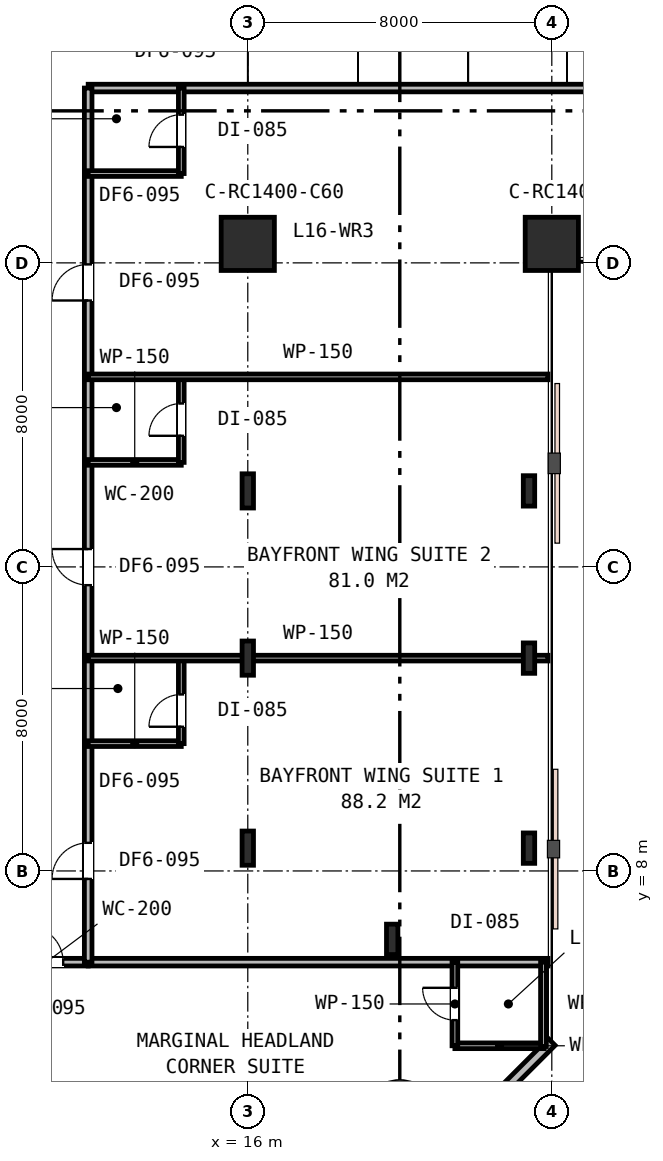
"""IFC4 building model, lengths in metres.
Left out: names, types, materials, properties, quantities, classifications, styles, units other than length and angle.
Written with IfcOpenShell. Run it as: python <this file> out.ifc"""

import sys

from ifc_helpers import new_model, si_unit, direction, frame, frame_2d, origin, origin_2d, place, context, subcontext, project, spatial, rectangle, i_section, extrude, element, fill, save


model = new_model("IFC4")
c1 = context("Model", 3, precision=1e-05, world=origin(), true_north=direction((0.0, 1.0)))
c2 = subcontext(c1, "Body", "Model", "MODEL_VIEW")
j1 = project(units=[si_unit("LENGTHUNIT", "METRE"), si_unit("PLANEANGLEUNIT", "RADIAN")], contexts=[c1])
p1 = place(None, origin())
s1 = spatial("IfcSite", under=j1, at=p1, CompositionType="ELEMENT")
p2 = place(p1, origin())
s2 = spatial("IfcBuilding", under=s1, at=p2, CompositionType="ELEMENT")
p3 = place(p2, frame((0.0, 0.0, 65.4)))
s3 = spatial("IfcBuildingStorey", under=s2, at=p3, CompositionType="ELEMENT", Elevation=65.4)
for number, where, z_axis, x_axis in (
    (1, (16.0, 24.5, 0.0), (0.0, 0.0, 1.0), (1.0, 0.0, 0.0)),
    (2, (24.0, 24.5, 0.0), (0.0, 0.0, 1.0), (1.0, 0.0, 0.0)),
):
    element("IfcColumn", number, at=place(p3, frame(where, z_axis=z_axis, x_axis=x_axis)), inside=s3, PredefinedType="COLUMN", context=c2, shape_type="SweptSolid", body=[
        extrude(rectangle(XDim=1.4, YDim=1.4, at=origin_2d()), origin(), (0.0, 0.0, 1.0), 3.6),
    ])
for number, where, z_axis, x_axis in (
    (3, (19.8, 6.2, 0.0), (0.0, 0.0, 1.0), (1.0, 0.0, 0.0)),
    (4, (23.4, 8.6, 0.0), (0.0, 0.0, 1.0), (1.0, 0.0, 0.0)),
    (5, (23.4, 13.6, 0.0), (0.0, 0.0, 1.0), (1.0, 0.0, 0.0)),
    (6, (23.4, 18.0, 0.0), (0.0, 0.0, 1.0), (1.0, 0.0, 0.0)),
):
    element("IfcColumn", number, at=place(p3, frame(where, z_axis=z_axis, x_axis=x_axis)), inside=s3, PredefinedType="COLUMN", context=c2, shape_type="SweptSolid", body=[
        extrude(i_section(OverallWidth=0.3, OverallDepth=0.8, WebThickness=0.018, FlangeThickness=0.033, FilletRadius=0.03, at=origin_2d()), origin(), (0.0, 0.0, 1.0), 3.6),
    ])
for number, where, z_axis, x_axis in (
    (7, (16.0, 8.6, 0.0), (0.0, 0.0, 1.0), (1.0, 0.0, 0.0)),
    (8, (16.0, 13.6, 0.0), (0.0, 0.0, 1.0), (1.0, 0.0, 0.0)),
    (9, (16.0, 18.0, 0.0), (0.0, 0.0, 1.0), (1.0, 0.0, 0.0)),
):
    element("IfcColumn", number, at=place(p3, frame(where, z_axis=z_axis, x_axis=x_axis)), inside=s3, PredefinedType="COLUMN", context=c2, shape_type="SweptSolid", body=[
        extrude(i_section(OverallWidth=0.3, OverallDepth=0.9, WebThickness=0.018, FlangeThickness=0.035, FilletRadius=0.03, at=origin_2d()), origin(), (0.0, 0.0, 1.0), 3.6),
    ])
p4 = place(p3, frame((20.5, 0.0, 0.0), z_axis=(0.0, 0.0, 1.0), x_axis=(0.707106781187, 0.707106781187, 0.0)))
e10 = element("IfcWall", 10, at=p4, inside=s3, PredefinedType="STANDARD", context=c2, shape_type="SweptSolid", body=[
    extrude(rectangle(XDim=4.95, YDim=0.25, at=frame_2d((2.475, 0.0))), origin(), (0.0, 0.0, 1.0), 3.33),
])
p5 = place(p4, frame((1.465, 0.0, 0.75)))
e11 = element("IfcOpeningElement", 11, at=p5, cuts=e10, PredefinedType="OPENING", context=c2, shape_type="SweptSolid", body=[
    extrude(rectangle(XDim=1.8, YDim=1.85, at=frame_2d((0.9, 0.925))), frame((0.0, 0.135, 0.0), z_axis=(0.0, -1.0, 0.0), x_axis=(1.0, 0.0, 0.0)), (0.0, 0.0, 1.0), 0.27),
])
p6 = place(p3, frame((11.8, 28.6, 0.0), z_axis=(0.0, 0.0, 1.0), x_axis=(1.0, 0.0, 0.0)))
e12 = element("IfcWall", 12, at=p6, inside=s3, PredefinedType="PARTITIONING", context=c2, shape_type="SweptSolid", body=[
    extrude(rectangle(XDim=38.6, YDim=0.2, at=frame_2d((19.3, 0.0))), origin(), (0.0, 0.0, 1.0), 2.83),
])
p7 = place(p6, frame((14.3, 0.0, 0.0)))
e13 = element("IfcOpeningElement", 13, at=p7, cuts=e12, PredefinedType="OPENING", context=c2, shape_type="SweptSolid", body=[
    extrude(rectangle(XDim=0.95, YDim=2.15, at=frame_2d((0.475, 1.075))), frame((0.0, 0.11, 0.0), z_axis=(0.0, -1.0, 0.0), x_axis=(1.0, 0.0, 0.0)), (0.0, 0.0, 1.0), 0.22),
])
p8 = place(p6, frame((22.075, 0.0, 0.0)))
e14 = element("IfcOpeningElement", 14, at=p8, cuts=e12, PredefinedType="OPENING", context=c2, shape_type="SweptSolid", body=[
    extrude(rectangle(XDim=0.95, YDim=2.15, at=frame_2d((0.475, 1.075))), frame((0.0, 0.11, 0.0), z_axis=(0.0, -1.0, 0.0), x_axis=(1.0, 0.0, 0.0)), (0.0, 0.0, 1.0), 0.22),
])
p9 = place(p6, frame((28.829, 0.0, 0.0)))
e15 = element("IfcOpeningElement", 15, at=p9, cuts=e12, PredefinedType="OPENING", context=c2, shape_type="SweptSolid", body=[
    extrude(rectangle(XDim=0.95, YDim=2.15, at=frame_2d((0.475, 1.075))), frame((0.0, 0.11, 0.0), z_axis=(0.0, -1.0, 0.0), x_axis=(1.0, 0.0, 0.0)), (0.0, 0.0, 1.0), 0.22),
])
p10 = place(p6, frame((34.669, 0.0, 0.0)))
e16 = element("IfcOpeningElement", 16, at=p10, cuts=e12, PredefinedType="OPENING", context=c2, shape_type="SweptSolid", body=[
    extrude(rectangle(XDim=0.95, YDim=2.15, at=frame_2d((0.475, 1.075))), frame((0.0, 0.11, 0.0), z_axis=(0.0, -1.0, 0.0), x_axis=(1.0, 0.0, 0.0)), (0.0, 0.0, 1.0), 0.22),
])
p11 = place(p3, frame((11.8, 5.6, 0.0), z_axis=(0.0, 0.0, 1.0), x_axis=(1.0, 0.0, 0.0)))
e17 = element("IfcWall", 17, at=p11, inside=s3, PredefinedType="PARTITIONING", context=c2, shape_type="SweptSolid", body=[
    extrude(rectangle(XDim=12.1, YDim=0.2, at=frame_2d((6.05, 0.0))), origin(), (0.0, 0.0, 1.0), 2.83),
])
p12 = place(p3, frame((9.6, 5.6, 0.0), z_axis=(0.0, 0.0, 1.0), x_axis=(1.0, 0.0, 0.0)))
e18 = element("IfcWall", 18, at=p12, inside=s3, PredefinedType="PARTITIONING", context=c2, shape_type="SweptSolid", body=[
    extrude(rectangle(XDim=2.2, YDim=0.2, at=frame_2d((1.1, 0.0))), origin(), (0.0, 0.0, 1.0), 3.33),
])
p13 = place(p12, frame((0.593, 0.0, 0.0)))
e19 = element("IfcOpeningElement", 19, at=p13, cuts=e18, PredefinedType="OPENING", context=c2, shape_type="SweptSolid", body=[
    extrude(rectangle(XDim=0.95, YDim=2.15, at=frame_2d((0.475, 1.075))), frame((0.0, 0.11, 0.0), z_axis=(0.0, -1.0, 0.0), x_axis=(1.0, 0.0, 0.0)), (0.0, 0.0, 1.0), 0.22),
])
p14 = place(p3, frame((21.45, 3.4, 0.0), z_axis=(0.0, 0.0, 1.0), x_axis=(1.0, 0.0, 0.0)))
e20 = element("IfcWall", 20, at=p14, inside=s3, PredefinedType="PARTITIONING", context=c2, shape_type="SweptSolid", body=[
    extrude(rectangle(XDim=2.35, YDim=0.15, at=frame_2d((1.175, 0.0))), origin(), (0.0, 0.0, 1.0), 3.33),
])
p15 = place(p3, frame((21.45, 3.4, 0.0), z_axis=(0.0, 0.0, 1.0), x_axis=(0.0, 1.0, 0.0)))
e21 = element("IfcWall", 21, at=p15, inside=s3, PredefinedType="PARTITIONING", context=c2, shape_type="SweptSolid", body=[
    extrude(rectangle(XDim=2.2, YDim=0.15, at=frame_2d((1.1, 0.0))), origin(), (0.0, 0.0, 1.0), 3.33),
])
p16 = place(p15, frame((0.675, 0.0, 0.0)))
e22 = element("IfcOpeningElement", 22, at=p16, cuts=e21, PredefinedType="OPENING", context=c2, shape_type="SweptSolid", body=[
    extrude(rectangle(XDim=0.85, YDim=2.15, at=frame_2d((0.425, 1.075))), frame((0.0, 0.085, 0.0), z_axis=(0.0, -1.0, 0.0), x_axis=(1.0, 0.0, 0.0)), (0.0, 0.0, 1.0), 0.17),
])
p17 = place(p3, frame((23.78, 5.6, 0.0), z_axis=(0.0, 0.0, 1.0), x_axis=(0.0, -1.0, 0.0)))
e23 = element("IfcWall", 23, at=p17, inside=s3, PredefinedType="PARTITIONING", context=c2, shape_type="SweptSolid", body=[
    extrude(rectangle(XDim=2.22, YDim=0.15, at=frame_2d((1.11, 0.0))), origin(), (0.0, 0.0, 1.0), 3.33),
])
p18 = place(p3, frame((11.8, 5.6, 0.0), z_axis=(0.0, 0.0, 1.0), x_axis=(0.0, 1.0, 0.0)))
e24 = element("IfcWall", 24, at=p18, inside=s3, PredefinedType="PARTITIONING", context=c2, shape_type="SweptSolid", body=[
    extrude(rectangle(XDim=23.0, YDim=0.2, at=frame_2d((11.5, 0.0))), origin(), (0.0, 0.0, 1.0), 2.83),
])
p19 = place(p18, frame((2.19, 0.0, 0.0)))
e25 = element("IfcOpeningElement", 25, at=p19, cuts=e24, PredefinedType="OPENING", context=c2, shape_type="SweptSolid", body=[
    extrude(rectangle(XDim=0.95, YDim=2.15, at=frame_2d((0.475, 1.075))), frame((0.0, 0.11, 0.0), z_axis=(0.0, -1.0, 0.0), x_axis=(1.0, 0.0, 0.0)), (0.0, 0.0, 1.0), 0.22),
])
p20 = place(p18, frame((9.92, 0.0, 0.0)))
e26 = element("IfcOpeningElement", 26, at=p20, cuts=e24, PredefinedType="OPENING", context=c2, shape_type="SweptSolid", body=[
    extrude(rectangle(XDim=0.95, YDim=2.15, at=frame_2d((0.475, 1.075))), frame((0.0, 0.11, 0.0), z_axis=(0.0, -1.0, 0.0), x_axis=(1.0, 0.0, 0.0)), (0.0, 0.0, 1.0), 0.22),
])
p21 = place(p18, frame((17.41, 0.0, 0.0)))
e27 = element("IfcOpeningElement", 27, at=p21, cuts=e24, PredefinedType="OPENING", context=c2, shape_type="SweptSolid", body=[
    extrude(rectangle(XDim=0.95, YDim=2.15, at=frame_2d((0.475, 1.075))), frame((0.0, 0.11, 0.0), z_axis=(0.0, -1.0, 0.0), x_axis=(1.0, 0.0, 0.0)), (0.0, 0.0, 1.0), 0.22),
])
p22 = place(p3, frame((11.8, 11.35, 0.0), z_axis=(0.0, 0.0, 1.0), x_axis=(1.0, 0.0, 0.0)))
e28 = element("IfcWall", 28, at=p22, inside=s3, PredefinedType="PARTITIONING", context=c2, shape_type="SweptSolid", body=[
    extrude(rectangle(XDim=2.45, YDim=0.15, at=frame_2d((1.225, 0.0))), origin(), (0.0, 0.0, 1.0), 3.02),
])
p23 = place(p3, frame((14.25, 11.35, 0.0), z_axis=(0.0, 0.0, 1.0), x_axis=(0.0, 1.0, 0.0)))
e29 = element("IfcWall", 29, at=p23, inside=s3, PredefinedType="PARTITIONING", context=c2, shape_type="SweptSolid", body=[
    extrude(rectangle(XDim=2.25, YDim=0.15, at=frame_2d((1.125, 0.0))), origin(), (0.0, 0.0, 1.0), 2.83),
])
p24 = place(p23, frame((0.444, 0.0, 0.0)))
e30 = element("IfcOpeningElement", 30, at=p24, cuts=e29, PredefinedType="OPENING", context=c2, shape_type="SweptSolid", body=[
    extrude(rectangle(XDim=0.85, YDim=2.15, at=frame_2d((0.425, 1.075))), frame((0.0, 0.085, 0.0), z_axis=(0.0, -1.0, 0.0), x_axis=(1.0, 0.0, 0.0)), (0.0, 0.0, 1.0), 0.17),
])
p25 = place(p3, frame((11.8, 13.6, 0.0), z_axis=(0.0, 0.0, 1.0), x_axis=(1.0, 0.0, 0.0)))
e31 = element("IfcWall", 31, at=p25, inside=s3, PredefinedType="PARTITIONING", context=c2, shape_type="SweptSolid", body=[
    extrude(rectangle(XDim=12.1, YDim=0.15, at=frame_2d((6.05, 0.0))), origin(), (0.0, 0.0, 1.0), 2.83),
])
p26 = place(p3, frame((11.8, 18.75, 0.0), z_axis=(0.0, 0.0, 1.0), x_axis=(1.0, 0.0, 0.0)))
e32 = element("IfcWall", 32, at=p26, inside=s3, PredefinedType="PARTITIONING", context=c2, shape_type="SweptSolid", body=[
    extrude(rectangle(XDim=2.45, YDim=0.15, at=frame_2d((1.225, 0.0))), origin(), (0.0, 0.0, 1.0), 3.33),
])
p27 = place(p3, frame((14.25, 18.75, 0.0), z_axis=(0.0, 0.0, 1.0), x_axis=(0.0, 1.0, 0.0)))
e33 = element("IfcWall", 33, at=p27, inside=s3, PredefinedType="PARTITIONING", context=c2, shape_type="SweptSolid", body=[
    extrude(rectangle(XDim=2.25, YDim=0.15, at=frame_2d((1.125, 0.0))), origin(), (0.0, 0.0, 1.0), 3.33),
])
p28 = place(p27, frame((0.7, 0.0, 0.0)))
e34 = element("IfcOpeningElement", 34, at=p28, cuts=e33, PredefinedType="OPENING", context=c2, shape_type="SweptSolid", body=[
    extrude(rectangle(XDim=0.85, YDim=2.15, at=frame_2d((0.425, 1.075))), frame((0.0, 0.085, 0.0), z_axis=(0.0, -1.0, 0.0), x_axis=(1.0, 0.0, 0.0)), (0.0, 0.0, 1.0), 0.17),
])
p29 = place(p3, frame((11.8, 21.0, 0.0), z_axis=(0.0, 0.0, 1.0), x_axis=(1.0, 0.0, 0.0)))
e35 = element("IfcWall", 35, at=p29, inside=s3, PredefinedType="PARTITIONING", context=c2, shape_type="SweptSolid", body=[
    extrude(rectangle(XDim=12.1, YDim=0.15, at=frame_2d((6.05, 0.0))), origin(), (0.0, 0.0, 1.0), 2.83),
])
p30 = place(p3, frame((11.8, 26.35, 0.0), z_axis=(0.0, 0.0, 1.0), x_axis=(1.0, 0.0, 0.0)))
e36 = element("IfcWall", 36, at=p30, inside=s3, PredefinedType="PARTITIONING", context=c2, shape_type="SweptSolid", body=[
    extrude(rectangle(XDim=2.45, YDim=0.15, at=frame_2d((1.225, 0.0))), origin(), (0.0, 0.0, 1.0), 3.33),
])
p31 = place(p3, frame((14.25, 26.35, 0.0), z_axis=(0.0, 0.0, 1.0), x_axis=(0.0, 1.0, 0.0)))
e37 = element("IfcWall", 37, at=p31, inside=s3, PredefinedType="PARTITIONING", context=c2, shape_type="SweptSolid", body=[
    extrude(rectangle(XDim=2.25, YDim=0.15, at=frame_2d((1.125, 0.0))), origin(), (0.0, 0.0, 1.0), 3.33),
])
p32 = place(p31, frame((0.7, 0.0, 0.0)))
e38 = element("IfcOpeningElement", 38, at=p32, cuts=e37, PredefinedType="OPENING", context=c2, shape_type="SweptSolid", body=[
    extrude(rectangle(XDim=0.85, YDim=2.15, at=frame_2d((0.425, 1.075))), frame((0.0, 0.085, 0.0), z_axis=(0.0, -1.0, 0.0), x_axis=(1.0, 0.0, 0.0)), (0.0, 0.0, 1.0), 0.17),
])
p33 = place(p13, origin())
e39 = element("IfcDoor", 39, at=p33, inside=s3, OperationType="SINGLE_SWING_LEFT", PredefinedType="DOOR", context=c2, shape_type="SweptSolid", body=[
    extrude(rectangle(XDim=0.95, YDim=2.15, at=frame_2d((0.475, 1.075))), frame((0.0, 0.025, 0.0), z_axis=(0.0, -1.0, 0.0), x_axis=(1.0, 0.0, 0.0)), (0.0, 0.0, 1.0), 0.05),
])
fill(e19, e39)
p34 = place(p16, origin())
e40 = element("IfcDoor", 40, at=p34, inside=s3, OperationType="SINGLE_SWING_RIGHT", PredefinedType="DOOR", context=c2, shape_type="SweptSolid", body=[
    extrude(rectangle(XDim=0.85, YDim=2.15, at=frame_2d((0.425, 1.075))), frame((0.0, 0.025, 0.0), z_axis=(0.0, -1.0, 0.0), x_axis=(1.0, 0.0, 0.0)), (0.0, 0.0, 1.0), 0.05),
])
fill(e22, e40)
p35 = place(p19, origin())
e41 = element("IfcDoor", 41, at=p35, inside=s3, OperationType="SINGLE_SWING_LEFT", PredefinedType="DOOR", context=c2, shape_type="SweptSolid", body=[
    extrude(rectangle(XDim=0.95, YDim=2.15, at=frame_2d((0.475, 1.075))), frame((0.0, 0.025, 0.0), z_axis=(0.0, -1.0, 0.0), x_axis=(1.0, 0.0, 0.0)), (0.0, 0.0, 1.0), 0.05),
])
fill(e25, e41)
p36 = place(p24, origin())
e42 = element("IfcDoor", 42, at=p36, inside=s3, OperationType="SINGLE_SWING_LEFT", PredefinedType="DOOR", context=c2, shape_type="SweptSolid", body=[
    extrude(rectangle(XDim=0.85, YDim=2.15, at=frame_2d((0.425, 1.075))), frame((0.0, 0.025, 0.0), z_axis=(0.0, -1.0, 0.0), x_axis=(1.0, 0.0, 0.0)), (0.0, 0.0, 1.0), 0.05),
])
fill(e30, e42)
p37 = place(p20, origin())
e43 = element("IfcDoor", 43, at=p37, inside=s3, OperationType="SINGLE_SWING_RIGHT", PredefinedType="DOOR", context=c2, shape_type="SweptSolid", body=[
    extrude(rectangle(XDim=0.95, YDim=2.15, at=frame_2d((0.475, 1.075))), frame((0.0, 0.025, 0.0), z_axis=(0.0, -1.0, 0.0), x_axis=(1.0, 0.0, 0.0)), (0.0, 0.0, 1.0), 0.05),
])
fill(e26, e43)
p38 = place(p28, origin())
e44 = element("IfcDoor", 44, at=p38, inside=s3, OperationType="SINGLE_SWING_LEFT", PredefinedType="DOOR", context=c2, shape_type="SweptSolid", body=[
    extrude(rectangle(XDim=0.85, YDim=2.15, at=frame_2d((0.425, 1.075))), frame((0.0, 0.025, 0.0), z_axis=(0.0, -1.0, 0.0), x_axis=(1.0, 0.0, 0.0)), (0.0, 0.0, 1.0), 0.05),
])
fill(e34, e44)
p39 = place(p21, origin())
e45 = element("IfcDoor", 45, at=p39, inside=s3, OperationType="SINGLE_SWING_LEFT", PredefinedType="DOOR", context=c2, shape_type="SweptSolid", body=[
    extrude(rectangle(XDim=0.95, YDim=2.15, at=frame_2d((0.475, 1.075))), frame((0.0, 0.025, 0.0), z_axis=(0.0, -1.0, 0.0), x_axis=(1.0, 0.0, 0.0)), (0.0, 0.0, 1.0), 0.05),
])
fill(e27, e45)
p40 = place(p32, origin())
e46 = element("IfcDoor", 46, at=p40, inside=s3, OperationType="SINGLE_SWING_LEFT", PredefinedType="DOOR", context=c2, shape_type="SweptSolid", body=[
    extrude(rectangle(XDim=0.85, YDim=2.15, at=frame_2d((0.425, 1.075))), frame((0.0, 0.025, 0.0), z_axis=(0.0, -1.0, 0.0), x_axis=(1.0, 0.0, 0.0)), (0.0, 0.0, 1.0), 0.05),
])
fill(e38, e46)
save(model, sys.argv[1])
